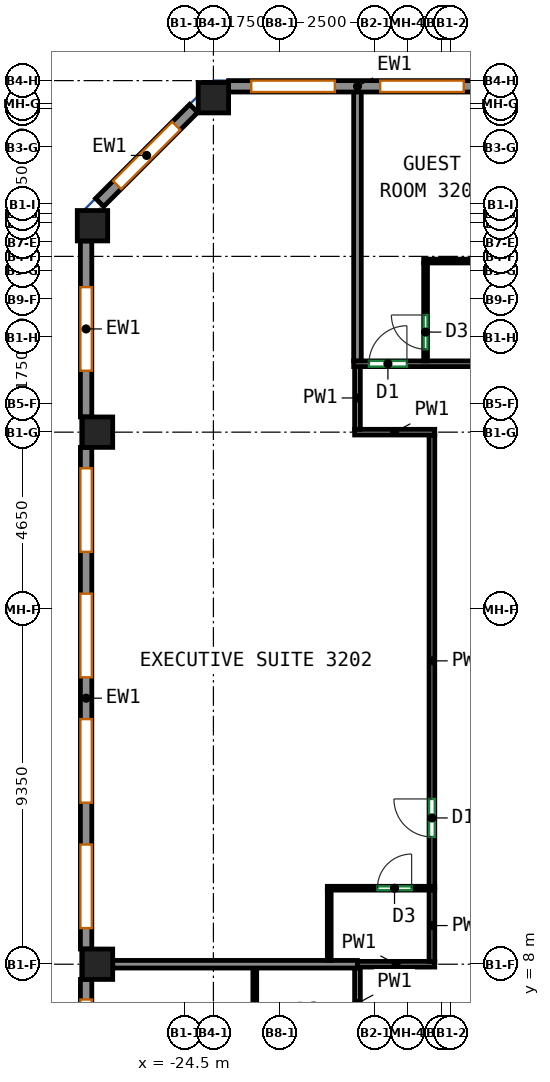
"""IFC4 building model, lengths in metres.
Left out: names, types, materials, properties, quantities, classifications, styles, units other than length and angle.
Written with IfcOpenShell. Run it as: python <this file> out.ifc"""

import sys

from ifc_helpers import new_model, si_unit, direction, frame, frame_2d, origin, origin_2d, place, context, subcontext, project, spatial, rectangle, extrude, source, transform, mapped, element, fill, save


model = new_model("IFC4")
c1 = context("Model", 3, precision=1e-05, world=origin(), true_north=direction((0.0, 1.0)))
c2 = subcontext(c1, "Body", "Model", "MODEL_VIEW")
j1 = project(units=[si_unit("LENGTHUNIT", "METRE"), si_unit("PLANEANGLEUNIT", "RADIAN")], contexts=[c1])
p1 = place(None, origin())
s1 = spatial("IfcSite", under=j1, at=p1, CompositionType="ELEMENT")
p2 = place(p1, origin())
s2 = spatial("IfcBuilding", under=s1, at=p2, CompositionType="ELEMENT")
p3 = place(p2, frame((0.0, 0.0, 143.9)))
s3 = spatial("IfcBuildingStorey", under=s2, at=p3, CompositionType="ELEMENT", Elevation=143.9)
m1 = source(origin(), c2, "Body", "SweptSolid", [
    extrude(rectangle(XDim=0.8, YDim=0.8, at=origin_2d()), origin(), (0.0, 0.0, 1.0), 3.12),
])
for number, where, z_axis, x_axis in (
    (1, (-26.932, 27.432, 0.0), (0.0, 0.0, 1.0), (1.0, 0.0, 0.0)),
    (2, (-26.8, 8.0, 0.0), (0.0, 0.0, 1.0), (1.0, 0.0, 0.0)),
    (3, (-26.8, 22.0, 0.0), (0.0, 0.0, 1.0), (1.0, 0.0, 0.0)),
    (4, (-23.75, 30.8, 0.0), (0.0, 0.0, 1.0), (1.0, 0.0, 0.0)),
):
    element("IfcColumn", number, at=place(p3, frame(where, z_axis=z_axis, x_axis=x_axis)), inside=s3, PredefinedType="COLUMN", context=c2, shape_type="MappedRepresentation", body=[
        mapped(m1, transform((0.0, 0.0, 0.0))),
    ])
m2 = source(origin(), c2, "Body", "SweptSolid", [
    extrude(rectangle(XDim=6.783, YDim=0.3, at=frame_2d((3.392, 0.0))), origin(), (0.0, 0.0, 1.0), 3.12),
])
p4 = place(p3, frame((-16.567, 31.1, 0.0), z_axis=(0.0, 0.0, 1.0), x_axis=(-1.0, 0.0, 0.0)))
e5 = element("IfcWall", 5, at=p4, inside=s3, PredefinedType="SOLIDWALL", context=c2, shape_type="MappedRepresentation", body=[
    mapped(m2, transform((0.0, 0.0, 0.0))),
])
p5 = place(p4, frame((0.596, 0.0, 0.85)))
e6 = element("IfcOpeningElement", 6, at=p5, cuts=e5, PredefinedType="OPENING", context=c2, shape_type="SweptSolid", body=[
    extrude(rectangle(XDim=2.2, YDim=1.95, at=frame_2d((1.1, 0.975))), frame((0.0, 0.16, 0.0), z_axis=(0.0, -1.0, 0.0), x_axis=(1.0, 0.0, 0.0)), (0.0, 0.0, 1.0), 0.32),
])
p6 = place(p4, frame((3.988, 0.0, 0.85)))
e7 = element("IfcOpeningElement", 7, at=p6, cuts=e5, PredefinedType="OPENING", context=c2, shape_type="SweptSolid", body=[
    extrude(rectangle(XDim=2.2, YDim=1.95, at=frame_2d((1.1, 0.975))), frame((0.0, 0.16, 0.0), z_axis=(0.0, -1.0, 0.0), x_axis=(1.0, 0.0, 0.0)), (0.0, 0.0, 1.0), 0.32),
])
m3 = source(origin(), c2, "Body", "SweptSolid", [
    extrude(rectangle(XDim=3.5, YDim=0.3, at=frame_2d((1.75, 0.0))), origin(), (0.0, 0.0, 1.0), 3.12),
])
p7 = place(p3, frame((-24.269, 30.519, 0.0), z_axis=(0.0, 0.0, 1.0), x_axis=(-0.707141656123, -0.70707190453, 0.0)))
e8 = element("IfcWall", 8, at=p7, inside=s3, PredefinedType="SOLIDWALL", context=c2, shape_type="MappedRepresentation", body=[
    mapped(m3, transform((0.0, 0.0, 0.0))),
])
p8 = place(p7, frame((0.65, 0.0, 0.85)))
e9 = element("IfcOpeningElement", 9, at=p8, cuts=e8, PredefinedType="OPENING", context=c2, shape_type="SweptSolid", body=[
    extrude(rectangle(XDim=2.2, YDim=1.95, at=frame_2d((1.1, 0.975))), frame((0.0, 0.16, 0.0), z_axis=(0.0, -1.0, 0.0), x_axis=(1.0, 0.0, 0.0)), (0.0, 0.0, 1.0), 0.32),
])
m4 = source(origin(), c2, "Body", "SweptSolid", [
    extrude(rectangle(XDim=4.632, YDim=0.3, at=frame_2d((2.316, 0.0))), origin(), (0.0, 0.0, 1.0), 3.12),
])
p9 = place(p3, frame((-27.1, 27.032, 0.0), z_axis=(0.0, 0.0, 1.0), x_axis=(0.0, -1.0, 0.0)))
e10 = element("IfcWall", 10, at=p9, inside=s3, PredefinedType="SOLIDWALL", context=c2, shape_type="MappedRepresentation", body=[
    mapped(m4, transform((0.0, 0.0, 0.0))),
])
p10 = place(p9, frame((1.216, 0.0, 0.85)))
e11 = element("IfcOpeningElement", 11, at=p10, cuts=e10, PredefinedType="OPENING", context=c2, shape_type="SweptSolid", body=[
    extrude(rectangle(XDim=2.2, YDim=1.95, at=frame_2d((1.1, 0.975))), frame((0.0, 0.16, 0.0), z_axis=(0.0, -1.0, 0.0), x_axis=(1.0, 0.0, 0.0)), (0.0, 0.0, 1.0), 0.32),
])
m5 = source(origin(), c2, "Body", "SweptSolid", [
    extrude(rectangle(XDim=13.2, YDim=0.3, at=frame_2d((6.6, 0.0))), origin(), (0.0, 0.0, 1.0), 3.12),
])
p11 = place(p3, frame((-27.1, 21.6, 0.0), z_axis=(0.0, 0.0, 1.0), x_axis=(0.0, -1.0, 0.0)))
e12 = element("IfcWall", 12, at=p11, inside=s3, PredefinedType="SOLIDWALL", context=c2, shape_type="MappedRepresentation", body=[
    mapped(m5, transform((0.0, 0.0, 0.0))),
])
p12 = place(p11, frame((0.55, 0.0, 0.85)))
e13 = element("IfcOpeningElement", 13, at=p12, cuts=e12, PredefinedType="OPENING", context=c2, shape_type="SweptSolid", body=[
    extrude(rectangle(XDim=2.2, YDim=1.95, at=frame_2d((1.1, 0.975))), frame((0.0, 0.16, 0.0), z_axis=(0.0, -1.0, 0.0), x_axis=(1.0, 0.0, 0.0)), (0.0, 0.0, 1.0), 0.32),
])
p13 = place(p11, frame((3.85, 0.0, 0.85)))
e14 = element("IfcOpeningElement", 14, at=p13, cuts=e12, PredefinedType="OPENING", context=c2, shape_type="SweptSolid", body=[
    extrude(rectangle(XDim=2.2, YDim=1.95, at=frame_2d((1.1, 0.975))), frame((0.0, 0.16, 0.0), z_axis=(0.0, -1.0, 0.0), x_axis=(1.0, 0.0, 0.0)), (0.0, 0.0, 1.0), 0.32),
])
p14 = place(p11, frame((7.15, 0.0, 0.85)))
e15 = element("IfcOpeningElement", 15, at=p14, cuts=e12, PredefinedType="OPENING", context=c2, shape_type="SweptSolid", body=[
    extrude(rectangle(XDim=2.2, YDim=1.95, at=frame_2d((1.1, 0.975))), frame((0.0, 0.16, 0.0), z_axis=(0.0, -1.0, 0.0), x_axis=(1.0, 0.0, 0.0)), (0.0, 0.0, 1.0), 0.32),
])
p15 = place(p11, frame((10.45, 0.0, 0.85)))
e16 = element("IfcOpeningElement", 16, at=p15, cuts=e12, PredefinedType="OPENING", context=c2, shape_type="SweptSolid", body=[
    extrude(rectangle(XDim=2.2, YDim=1.95, at=frame_2d((1.1, 0.975))), frame((0.0, 0.16, 0.0), z_axis=(0.0, -1.0, 0.0), x_axis=(1.0, 0.0, 0.0)), (0.0, 0.0, 1.0), 0.32),
])
m6 = source(origin(), c2, "Body", "SweptSolid", [
    extrude(rectangle(XDim=6.513, YDim=0.3, at=frame_2d((3.256, 0.0))), origin(), (0.0, 0.0, 1.0), 3.12),
])
p16 = place(p3, frame((-27.1, 7.6, 0.0), z_axis=(0.0, 0.0, 1.0), x_axis=(0.0, -1.0, 0.0)))
e17 = element("IfcWall", 17, at=p16, inside=s3, PredefinedType="SOLIDWALL", context=c2, shape_type="MappedRepresentation", body=[
    mapped(m6, transform((0.0, 0.0, 0.0))),
])
p17 = place(p16, frame((0.528, 0.0, 0.85)))
e18 = element("IfcOpeningElement", 18, at=p17, cuts=e17, PredefinedType="OPENING", context=c2, shape_type="SweptSolid", body=[
    extrude(rectangle(XDim=2.2, YDim=1.95, at=frame_2d((1.1, 0.975))), frame((0.0, 0.16, 0.0), z_axis=(0.0, -1.0, 0.0), x_axis=(1.0, 0.0, 0.0)), (0.0, 0.0, 1.0), 0.32),
])
p18 = place(p16, frame((3.784, 0.0, 0.85)))
e19 = element("IfcOpeningElement", 19, at=p18, cuts=e17, PredefinedType="OPENING", context=c2, shape_type="SweptSolid", body=[
    extrude(rectangle(XDim=2.2, YDim=1.95, at=frame_2d((1.1, 0.975))), frame((0.0, 0.16, 0.0), z_axis=(0.0, -1.0, 0.0), x_axis=(1.0, 0.0, 0.0)), (0.0, 0.0, 1.0), 0.32),
])
p19 = place(p3, frame((-19.959, 6.04, 0.0), z_axis=(0.0, 0.0, 1.0), x_axis=(0.0, 1.0, 0.0)))
e20 = element("IfcWall", 20, at=p19, inside=s3, PredefinedType="PARTITIONING", context=c2, shape_type="SweptSolid", body=[
    extrude(rectangle(XDim=1.86, YDim=0.15, at=frame_2d((0.93, 0.0))), origin(), (0.0, 0.0, 1.0), 3.12),
])
p20 = place(p3, frame((-18.0, 10.04, 0.0), z_axis=(0.0, 0.0, 1.0), x_axis=(0.0, 1.0, 0.0)))
e21 = element("IfcWall", 21, at=p20, inside=s3, PredefinedType="PARTITIONING", context=c2, shape_type="SweptSolid", body=[
    extrude(rectangle(XDim=11.885, YDim=0.15, at=frame_2d((5.942, 0.0))), origin(), (0.0, 0.0, 1.0), 3.12),
])
p21 = place(p20, frame((1.309, 0.0, 0.0)))
e22 = element("IfcOpeningElement", 22, at=p21, cuts=e21, PredefinedType="OPENING", context=c2, shape_type="SweptSolid", body=[
    extrude(rectangle(XDim=1.0, YDim=2.1, at=frame_2d((0.5, 1.05))), frame((0.0, 0.085, 0.0), z_axis=(0.0, -1.0, 0.0), x_axis=(1.0, 0.0, 0.0)), (0.0, 0.0, 1.0), 0.17),
])
p22 = place(p3, frame((-20.034, 22.0, 0.0), z_axis=(0.0, 0.0, 1.0), x_axis=(1.0, 0.0, 0.0)))
e23 = element("IfcWall", 23, at=p22, inside=s3, PredefinedType="PARTITIONING", context=c2, shape_type="SweptSolid", body=[
    extrude(rectangle(XDim=2.109, YDim=0.15, at=frame_2d((1.054, 0.0))), origin(), (0.0, 0.0, 1.0), 3.12),
])
p23 = place(p3, frame((-19.959, 22.075, 0.0), z_axis=(0.0, 0.0, 1.0), x_axis=(0.0, 1.0, 0.0)))
e24 = element("IfcWall", 24, at=p23, inside=s3, PredefinedType="PARTITIONING", context=c2, shape_type="SweptSolid", body=[
    extrude(rectangle(XDim=1.65, YDim=0.15, at=frame_2d((0.825, 0.0))), origin(), (0.0, 0.0, 1.0), 3.12),
])
p24 = place(p3, frame((-17.925, 8.0, 0.0), z_axis=(0.0, 0.0, 1.0), x_axis=(-1.0, 0.0, 0.0)))
e25 = element("IfcWall", 25, at=p24, inside=s3, PredefinedType="PARTITIONING", context=c2, shape_type="SweptSolid", body=[
    extrude(rectangle(XDim=2.034, YDim=0.15, at=frame_2d((1.017, 0.0))), origin(), (0.0, 0.0, 1.0), 3.12),
])
p25 = place(p3, frame((-18.0, 8.075, 0.0), z_axis=(0.0, 0.0, 1.0), x_axis=(0.0, 1.0, 0.0)))
e26 = element("IfcWall", 26, at=p25, inside=s3, PredefinedType="PARTITIONING", context=c2, shape_type="SweptSolid", body=[
    extrude(rectangle(XDim=1.885, YDim=0.15, at=frame_2d((0.942, 0.0))), origin(), (0.0, 0.0, 1.0), 3.12),
])
p26 = place(p3, frame((-20.059, 23.8, 0.0), z_axis=(0.0, 0.0, 1.0), x_axis=(1.0, 0.0, 0.0)))
e27 = element("IfcWall", 27, at=p26, inside=s3, PredefinedType="PARTITIONING", context=c2, shape_type="SweptSolid", body=[
    extrude(rectangle(XDim=41.909, YDim=0.15, at=frame_2d((20.955, 0.0))), origin(), (0.0, 0.0, 1.0), 3.12),
])
p27 = place(p26, frame((0.401, 0.0, 0.0)))
e28 = element("IfcOpeningElement", 28, at=p27, cuts=e27, PredefinedType="OPENING", context=c2, shape_type="SweptSolid", body=[
    extrude(rectangle(XDim=1.0, YDim=2.1, at=frame_2d((0.5, 1.05))), frame((0.0, 0.085, 0.0), z_axis=(0.0, -1.0, 0.0), x_axis=(1.0, 0.0, 0.0)), (0.0, 0.0, 1.0), 0.17),
])
p28 = place(p26, frame((6.082, 0.0, 0.0)))
e29 = element("IfcOpeningElement", 29, at=p28, cuts=e27, PredefinedType="OPENING", context=c2, shape_type="SweptSolid", body=[
    extrude(rectangle(XDim=1.0, YDim=2.1, at=frame_2d((0.5, 1.05))), frame((0.0, 0.085, 0.0), z_axis=(0.0, -1.0, 0.0), x_axis=(1.0, 0.0, 0.0)), (0.0, 0.0, 1.0), 0.17),
])
p29 = place(p26, frame((8.08, 0.0, 0.0)))
e30 = element("IfcOpeningElement", 30, at=p29, cuts=e27, PredefinedType="OPENING", context=c2, shape_type="SweptSolid", body=[
    extrude(rectangle(XDim=1.0, YDim=2.1, at=frame_2d((0.5, 1.05))), frame((0.0, 0.085, 0.0), z_axis=(0.0, -1.0, 0.0), x_axis=(1.0, 0.0, 0.0)), (0.0, 0.0, 1.0), 0.17),
])
p30 = place(p26, frame((13.769, 0.0, 0.0)))
e31 = element("IfcOpeningElement", 31, at=p30, cuts=e27, PredefinedType="OPENING", context=c2, shape_type="SweptSolid", body=[
    extrude(rectangle(XDim=1.0, YDim=2.1, at=frame_2d((0.5, 1.05))), frame((0.0, 0.085, 0.0), z_axis=(0.0, -1.0, 0.0), x_axis=(1.0, 0.0, 0.0)), (0.0, 0.0, 1.0), 0.17),
])
p31 = place(p26, frame((15.56, 0.0, 0.0)))
e32 = element("IfcOpeningElement", 32, at=p31, cuts=e27, PredefinedType="OPENING", context=c2, shape_type="SweptSolid", body=[
    extrude(rectangle(XDim=1.0, YDim=2.1, at=frame_2d((0.5, 1.05))), frame((0.0, 0.085, 0.0), z_axis=(0.0, -1.0, 0.0), x_axis=(1.0, 0.0, 0.0)), (0.0, 0.0, 1.0), 0.17),
])
p32 = place(p26, frame((21.625, 0.0, 0.0)))
e33 = element("IfcOpeningElement", 33, at=p32, cuts=e27, PredefinedType="OPENING", context=c2, shape_type="SweptSolid", body=[
    extrude(rectangle(XDim=1.0, YDim=2.1, at=frame_2d((0.5, 1.05))), frame((0.0, 0.085, 0.0), z_axis=(0.0, -1.0, 0.0), x_axis=(1.0, 0.0, 0.0)), (0.0, 0.0, 1.0), 0.17),
])
p33 = place(p26, frame((23.212, 0.0, 0.0)))
e34 = element("IfcOpeningElement", 34, at=p33, cuts=e27, PredefinedType="OPENING", context=c2, shape_type="SweptSolid", body=[
    extrude(rectangle(XDim=1.0, YDim=2.1, at=frame_2d((0.5, 1.05))), frame((0.0, 0.085, 0.0), z_axis=(0.0, -1.0, 0.0), x_axis=(1.0, 0.0, 0.0)), (0.0, 0.0, 1.0), 0.17),
])
p34 = place(p26, frame((29.038, 0.0, 0.0)))
e35 = element("IfcOpeningElement", 35, at=p34, cuts=e27, PredefinedType="OPENING", context=c2, shape_type="SweptSolid", body=[
    extrude(rectangle(XDim=1.0, YDim=2.1, at=frame_2d((0.5, 1.05))), frame((0.0, 0.085, 0.0), z_axis=(0.0, -1.0, 0.0), x_axis=(1.0, 0.0, 0.0)), (0.0, 0.0, 1.0), 0.17),
])
p35 = place(p26, frame((30.624, 0.0, 0.0)))
e36 = element("IfcOpeningElement", 36, at=p35, cuts=e27, PredefinedType="OPENING", context=c2, shape_type="SweptSolid", body=[
    extrude(rectangle(XDim=1.0, YDim=2.1, at=frame_2d((0.5, 1.05))), frame((0.0, 0.085, 0.0), z_axis=(0.0, -1.0, 0.0), x_axis=(1.0, 0.0, 0.0)), (0.0, 0.0, 1.0), 0.17),
])
p36 = place(p26, frame((36.622, 0.0, 0.0)))
e37 = element("IfcOpeningElement", 37, at=p36, cuts=e27, PredefinedType="OPENING", context=c2, shape_type="SweptSolid", body=[
    extrude(rectangle(XDim=1.0, YDim=2.1, at=frame_2d((0.5, 1.05))), frame((0.0, 0.085, 0.0), z_axis=(0.0, -1.0, 0.0), x_axis=(1.0, 0.0, 0.0)), (0.0, 0.0, 1.0), 0.17),
])
p37 = place(p26, frame((38.516, 0.0, 0.0)))
e38 = element("IfcOpeningElement", 38, at=p37, cuts=e27, PredefinedType="OPENING", context=c2, shape_type="SweptSolid", body=[
    extrude(rectangle(XDim=1.0, YDim=2.1, at=frame_2d((0.5, 1.05))), frame((0.0, 0.085, 0.0), z_axis=(0.0, -1.0, 0.0), x_axis=(1.0, 0.0, 0.0)), (0.0, 0.0, 1.0), 0.17),
])
p38 = place(p3, frame((-22.661, 6.05, 0.0), z_axis=(0.0, 0.0, 1.0), x_axis=(0.0, 1.0, 0.0)))
e39 = element("IfcWall", 39, at=p38, inside=s3, PredefinedType="PARTITIONING", context=c2, shape_type="SweptSolid", body=[
    extrude(rectangle(XDim=1.85, YDim=0.1, at=frame_2d((0.925, 0.0))), origin(), (0.0, 0.0, 1.0), 3.12),
])
p39 = place(p3, frame((-26.4, 8.0, 0.0), z_axis=(0.0, 0.0, 1.0), x_axis=(1.0, 0.0, 0.0)))
e40 = element("IfcWall", 40, at=p39, inside=s3, PredefinedType="PARTITIONING", context=c2, shape_type="SweptSolid", body=[
    extrude(rectangle(XDim=6.439, YDim=0.2, at=frame_2d((3.219, 0.0))), origin(), (0.0, 0.0, 1.0), 3.12),
])
p40 = place(p3, frame((-20.752, 10.0, 0.0), z_axis=(0.0, 0.0, 1.0), x_axis=(1.0, 0.0, 0.0)))
e41 = element("IfcWall", 41, at=p40, inside=s3, PredefinedType="PARTITIONING", context=c2, shape_type="SweptSolid", body=[
    extrude(rectangle(XDim=2.825, YDim=0.1, at=frame_2d((1.413, 0.0))), origin(), (0.0, 0.0, 1.0), 3.12),
])
p41 = place(p40, frame((1.318, 0.0, 0.0)))
e42 = element("IfcOpeningElement", 42, at=p41, cuts=e41, PredefinedType="OPENING", context=c2, shape_type="SweptSolid", body=[
    extrude(rectangle(XDim=0.9, YDim=2.1, at=frame_2d((0.45, 1.05))), frame((0.0, 0.06, 0.0), z_axis=(0.0, -1.0, 0.0), x_axis=(1.0, 0.0, 0.0)), (0.0, 0.0, 1.0), 0.12),
])
p42 = place(p3, frame((-20.702, 8.1, 0.0), z_axis=(0.0, 0.0, 1.0), x_axis=(0.0, 1.0, 0.0)))
e43 = element("IfcWall", 43, at=p42, inside=s3, PredefinedType="PARTITIONING", context=c2, shape_type="SweptSolid", body=[
    extrude(rectangle(XDim=1.85, YDim=0.1, at=frame_2d((0.925, 0.0))), origin(), (0.0, 0.0, 1.0), 3.12),
])
p43 = place(p3, frame((-19.959, 23.877, 0.0), z_axis=(0.0, 0.0, 1.0), x_axis=(0.0, 1.0, 0.0)))
e44 = element("IfcWall", 44, at=p43, inside=s3, PredefinedType="PARTITIONING", context=c2, shape_type="SweptSolid", body=[
    extrude(rectangle(XDim=7.123, YDim=0.2, at=frame_2d((3.562, 0.0))), origin(), (0.0, 0.0, 1.0), 3.12),
])
p44 = place(p3, frame((-18.217, 26.502, 0.0), z_axis=(0.0, 0.0, 1.0), x_axis=(1.0, 0.0, 0.0)))
e45 = element("IfcWall", 45, at=p44, inside=s3, PredefinedType="PARTITIONING", context=c2, shape_type="SweptSolid", body=[
    extrude(rectangle(XDim=1.5, YDim=0.1, at=frame_2d((0.75, 0.0))), origin(), (0.0, 0.0, 1.0), 3.12),
])
p45 = place(p3, frame((-18.167, 23.877, 0.0), z_axis=(0.0, 0.0, 1.0), x_axis=(0.0, 1.0, 0.0)))
e46 = element("IfcWall", 46, at=p45, inside=s3, PredefinedType="PARTITIONING", context=c2, shape_type="SweptSolid", body=[
    extrude(rectangle(XDim=2.575, YDim=0.1, at=frame_2d((1.288, 0.0))), origin(), (0.0, 0.0, 1.0), 3.12),
])
p46 = place(p45, frame((0.306, 0.0, 0.0)))
e47 = element("IfcOpeningElement", 47, at=p46, cuts=e46, PredefinedType="OPENING", context=c2, shape_type="SweptSolid", body=[
    extrude(rectangle(XDim=0.9, YDim=2.1, at=frame_2d((0.45, 1.05))), frame((0.0, 0.06, 0.0), z_axis=(0.0, -1.0, 0.0), x_axis=(1.0, 0.0, 0.0)), (0.0, 0.0, 1.0), 0.12),
])
p47 = place(p5, origin())
e48 = element("IfcWindow", 48, at=p47, inside=s3, PartitioningType="SINGLE_PANEL", PredefinedType="WINDOW", context=c2, shape_type="SweptSolid", body=[
    extrude(rectangle(XDim=2.2, YDim=1.95, at=frame_2d((1.1, 0.975))), frame((0.0, 0.03, 0.0), z_axis=(0.0, -1.0, 0.0), x_axis=(1.0, 0.0, 0.0)), (0.0, 0.0, 1.0), 0.06),
])
fill(e6, e48)
p48 = place(p6, origin())
e49 = element("IfcWindow", 49, at=p48, inside=s3, PartitioningType="SINGLE_PANEL", PredefinedType="WINDOW", context=c2, shape_type="SweptSolid", body=[
    extrude(rectangle(XDim=2.2, YDim=1.95, at=frame_2d((1.1, 0.975))), frame((0.0, 0.03, 0.0), z_axis=(0.0, -1.0, 0.0), x_axis=(1.0, 0.0, 0.0)), (0.0, 0.0, 1.0), 0.06),
])
fill(e7, e49)
p49 = place(p8, origin())
e50 = element("IfcWindow", 50, at=p49, inside=s3, PartitioningType="SINGLE_PANEL", PredefinedType="WINDOW", context=c2, shape_type="SweptSolid", body=[
    extrude(rectangle(XDim=2.2, YDim=1.95, at=frame_2d((1.1, 0.975))), frame((0.0, 0.03, 0.0), z_axis=(0.0, -1.0, 0.0), x_axis=(1.0, 0.0, 0.0)), (0.0, 0.0, 1.0), 0.06),
])
fill(e9, e50)
p50 = place(p10, origin())
e51 = element("IfcWindow", 51, at=p50, inside=s3, PartitioningType="SINGLE_PANEL", PredefinedType="WINDOW", context=c2, shape_type="SweptSolid", body=[
    extrude(rectangle(XDim=2.2, YDim=1.95, at=frame_2d((1.1, 0.975))), frame((0.0, 0.03, 0.0), z_axis=(0.0, -1.0, 0.0), x_axis=(1.0, 0.0, 0.0)), (0.0, 0.0, 1.0), 0.06),
])
fill(e11, e51)
p51 = place(p12, origin())
e52 = element("IfcWindow", 52, at=p51, inside=s3, PartitioningType="SINGLE_PANEL", PredefinedType="WINDOW", context=c2, shape_type="SweptSolid", body=[
    extrude(rectangle(XDim=2.2, YDim=1.95, at=frame_2d((1.1, 0.975))), frame((0.0, 0.03, 0.0), z_axis=(0.0, -1.0, 0.0), x_axis=(1.0, 0.0, 0.0)), (0.0, 0.0, 1.0), 0.06),
])
fill(e13, e52)
p52 = place(p13, origin())
e53 = element("IfcWindow", 53, at=p52, inside=s3, PartitioningType="SINGLE_PANEL", PredefinedType="WINDOW", context=c2, shape_type="SweptSolid", body=[
    extrude(rectangle(XDim=2.2, YDim=1.95, at=frame_2d((1.1, 0.975))), frame((0.0, 0.03, 0.0), z_axis=(0.0, -1.0, 0.0), x_axis=(1.0, 0.0, 0.0)), (0.0, 0.0, 1.0), 0.06),
])
fill(e14, e53)
p53 = place(p14, origin())
e54 = element("IfcWindow", 54, at=p53, inside=s3, PartitioningType="SINGLE_PANEL", PredefinedType="WINDOW", context=c2, shape_type="SweptSolid", body=[
    extrude(rectangle(XDim=2.2, YDim=1.95, at=frame_2d((1.1, 0.975))), frame((0.0, 0.03, 0.0), z_axis=(0.0, -1.0, 0.0), x_axis=(1.0, 0.0, 0.0)), (0.0, 0.0, 1.0), 0.06),
])
fill(e15, e54)
p54 = place(p15, origin())
e55 = element("IfcWindow", 55, at=p54, inside=s3, PartitioningType="SINGLE_PANEL", PredefinedType="WINDOW", context=c2, shape_type="SweptSolid", body=[
    extrude(rectangle(XDim=2.2, YDim=1.95, at=frame_2d((1.1, 0.975))), frame((0.0, 0.03, 0.0), z_axis=(0.0, -1.0, 0.0), x_axis=(1.0, 0.0, 0.0)), (0.0, 0.0, 1.0), 0.06),
])
fill(e16, e55)
p55 = place(p17, origin())
e56 = element("IfcWindow", 56, at=p55, inside=s3, PartitioningType="SINGLE_PANEL", PredefinedType="WINDOW", context=c2, shape_type="SweptSolid", body=[
    extrude(rectangle(XDim=2.2, YDim=1.95, at=frame_2d((1.1, 0.975))), frame((0.0, 0.03, 0.0), z_axis=(0.0, -1.0, 0.0), x_axis=(1.0, 0.0, 0.0)), (0.0, 0.0, 1.0), 0.06),
])
fill(e18, e56)
p56 = place(p41, origin())
e57 = element("IfcDoor", 57, at=p56, inside=s3, OperationType="SINGLE_SWING_RIGHT", PredefinedType="DOOR", context=c2, shape_type="SweptSolid", body=[
    extrude(rectangle(XDim=0.9, YDim=2.1, at=frame_2d((0.45, 1.05))), frame((0.0, 0.025, 0.0), z_axis=(0.0, -1.0, 0.0), x_axis=(1.0, 0.0, 0.0)), (0.0, 0.0, 1.0), 0.05),
])
fill(e42, e57)
p57 = place(p21, origin())
e58 = element("IfcDoor", 58, at=p57, inside=s3, OperationType="SINGLE_SWING_RIGHT", PredefinedType="DOOR", context=c2, shape_type="SweptSolid", body=[
    extrude(rectangle(XDim=1.0, YDim=2.1, at=frame_2d((0.5, 1.05))), frame((0.0, 0.025, 0.0), z_axis=(0.0, -1.0, 0.0), x_axis=(1.0, 0.0, 0.0)), (0.0, 0.0, 1.0), 0.05),
])
fill(e22, e58)
p58 = place(p27, origin())
e59 = element("IfcDoor", 59, at=p58, inside=s3, OperationType="SINGLE_SWING_RIGHT", PredefinedType="DOOR", context=c2, shape_type="SweptSolid", body=[
    extrude(rectangle(XDim=1.0, YDim=2.1, at=frame_2d((0.5, 1.05))), frame((0.0, 0.025, 0.0), z_axis=(0.0, -1.0, 0.0), x_axis=(1.0, 0.0, 0.0)), (0.0, 0.0, 1.0), 0.05),
])
fill(e28, e59)
p59 = place(p46, origin())
e60 = element("IfcDoor", 60, at=p59, inside=s3, OperationType="SINGLE_SWING_RIGHT", PredefinedType="DOOR", context=c2, shape_type="SweptSolid", body=[
    extrude(rectangle(XDim=0.9, YDim=2.1, at=frame_2d((0.45, 1.05))), frame((0.0, 0.025, 0.0), z_axis=(0.0, -1.0, 0.0), x_axis=(1.0, 0.0, 0.0)), (0.0, 0.0, 1.0), 0.05),
])
fill(e47, e60)
save(model, sys.argv[1])
